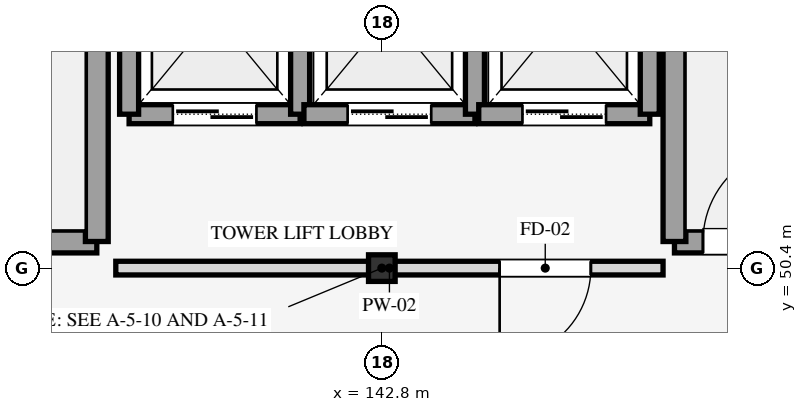
"""IFC4 building model, lengths in metres.
Left out: names, types, materials, properties, quantities, classifications, styles, units other than length and angle.
Written with IfcOpenShell. Run it as: python <this file> out.ifc"""

import sys

from ifc_helpers import new_model, si_unit, direction, frame, frame_2d, origin, origin_2d, place, context, subcontext, project, spatial, rectangle, i_section, extrude, element, fill, save


model = new_model("IFC4")
c1 = context("Model", 3, precision=1e-05, world=origin(), true_north=direction((0.0, 1.0)))
c2 = subcontext(c1, "Body", "Model", "MODEL_VIEW")
j1 = project(units=[si_unit("LENGTHUNIT", "METRE"), si_unit("PLANEANGLEUNIT", "RADIAN")], contexts=[c1])
p1 = place(None, origin())
s1 = spatial("IfcSite", under=j1, at=p1, CompositionType="ELEMENT")
p2 = place(p1, origin())
s2 = spatial("IfcBuilding", under=s1, at=p2, CompositionType="ELEMENT")
p3 = place(p2, frame((0.0, 0.0, 48.9)))
s3 = spatial("IfcBuildingStorey", under=s2, at=p3, CompositionType="ELEMENT", Elevation=48.9)
p4 = place(p3, frame((142.8, 50.4, 0.0), z_axis=(0.0, 0.0, 1.0), x_axis=(1.0, 0.0, 0.0)))
e1 = element("IfcColumn", 1, at=p4, inside=s3, PredefinedType="COLUMN", context=c2, shape_type="SweptSolid", body=[
    extrude(i_section(OverallWidth=0.35, OverallDepth=0.35, WebThickness=0.012, FlangeThickness=0.019, FilletRadius=0.02, at=origin_2d()), origin(), (0.0, 0.0, 1.0), 4.2),
])
p5 = place(p3, frame((135.05, 50.75, 0.0), z_axis=(0.0, 0.0, 1.0), x_axis=(1.0, 0.0, 0.0)))
e2 = element("IfcWall", 2, at=p5, inside=s3, PredefinedType="SHEAR", context=c2, shape_type="SweptSolid", body=[
    extrude(rectangle(XDim=4.0, YDim=0.3, at=frame_2d((2.0, 0.0))), origin(), (0.0, 0.0, 1.0), 4.2),
])
p6 = place(p5, frame((0.375, 0.0, 0.0)))
e3 = element("IfcOpeningElement", 3, at=p6, cuts=e2, PredefinedType="OPENING", context=c2, shape_type="SweptSolid", body=[
    extrude(rectangle(XDim=1.25, YDim=2.15, at=frame_2d((0.625, 1.075))), frame((0.0, 0.16, 0.0), z_axis=(0.0, -1.0, 0.0), x_axis=(1.0, 0.0, 0.0)), (0.0, 0.0, 1.0), 0.32),
])
p7 = place(p3, frame((139.05, 50.75, 0.0), z_axis=(0.0, 0.0, 1.0), x_axis=(0.0, 1.0, 0.0)))
e4 = element("IfcWall", 4, at=p7, inside=s3, PredefinedType="SHEAR", context=c2, shape_type="SweptSolid", body=[
    extrude(rectangle(XDim=14.3, YDim=0.3, at=frame_2d((7.15, 0.0))), origin(), (0.0, 0.0, 1.0), 4.2),
])
p8 = place(p3, frame((146.65, 50.75, 0.0), z_axis=(0.0, 0.0, 1.0), x_axis=(1.0, 0.0, 0.0)))
e5 = element("IfcWall", 5, at=p8, inside=s3, PredefinedType="SHEAR", context=c2, shape_type="SweptSolid", body=[
    extrude(rectangle(XDim=4.0, YDim=0.3, at=frame_2d((2.0, 0.0))), origin(), (0.0, 0.0, 1.0), 4.2),
])
p9 = place(p8, frame((0.375, 0.0, 0.0)))
e6 = element("IfcOpeningElement", 6, at=p9, cuts=e5, PredefinedType="OPENING", context=c2, shape_type="SweptSolid", body=[
    extrude(rectangle(XDim=1.25, YDim=2.15, at=frame_2d((0.625, 1.075))), frame((0.0, 0.16, 0.0), z_axis=(0.0, -1.0, 0.0), x_axis=(1.0, 0.0, 0.0)), (0.0, 0.0, 1.0), 0.32),
])
p10 = place(p3, frame((146.65, 50.75, 0.0), z_axis=(0.0, 0.0, 1.0), x_axis=(0.0, 1.0, 0.0)))
e7 = element("IfcWall", 7, at=p10, inside=s3, PredefinedType="SHEAR", context=c2, shape_type="SweptSolid", body=[
    extrude(rectangle(XDim=14.3, YDim=0.3, at=frame_2d((7.15, 0.0))), origin(), (0.0, 0.0, 1.0), 4.2),
])
p11 = place(p3, frame((139.475, 52.425, 0.0), z_axis=(0.0, 0.0, 1.0), x_axis=(1.0, 0.0, 0.0)))
e8 = element("IfcWall", 8, at=p11, inside=s3, PredefinedType="SHEAR", context=c2, shape_type="SweptSolid", body=[
    extrude(rectangle(XDim=2.25, YDim=0.25, at=frame_2d((1.125, 0.0))), origin(), (0.0, 0.0, 1.0), 3.96),
])
p12 = place(p11, frame((0.575, 0.0, 0.0)))
e9 = element("IfcOpeningElement", 9, at=p12, cuts=e8, PredefinedType="OPENING", context=c2, shape_type="SweptSolid", body=[
    extrude(rectangle(XDim=1.1, YDim=2.15, at=frame_2d((0.55, 1.075))), frame((0.0, 0.135, 0.0), z_axis=(0.0, -1.0, 0.0), x_axis=(1.0, 0.0, 0.0)), (0.0, 0.0, 1.0), 0.27),
])
for number, where, z_axis, x_axis in (
    (10, (139.475, 52.425, 0.0), (0.0, 0.0, 1.0), (0.0, 1.0, 0.0)),
    (11, (141.725, 52.425, 0.0), (0.0, 0.0, 1.0), (0.0, 1.0, 0.0)),
):
    element("IfcWall", number, at=place(p3, frame(where, z_axis=z_axis, x_axis=x_axis)), inside=s3, PredefinedType="SHEAR", context=c2, shape_type="SweptSolid", body=[
        extrude(rectangle(XDim=2.65, YDim=0.25, at=frame_2d((1.325, 0.0))), origin(), (0.0, 0.0, 1.0), 3.96),
    ])
p13 = place(p3, frame((141.775, 52.425, 0.0), z_axis=(0.0, 0.0, 1.0), x_axis=(1.0, 0.0, 0.0)))
e12 = element("IfcWall", 12, at=p13, inside=s3, PredefinedType="SHEAR", context=c2, shape_type="SweptSolid", body=[
    extrude(rectangle(XDim=2.25, YDim=0.25, at=frame_2d((1.125, 0.0))), origin(), (0.0, 0.0, 1.0), 3.96),
])
p14 = place(p13, frame((0.575, 0.0, 0.0)))
e13 = element("IfcOpeningElement", 13, at=p14, cuts=e12, PredefinedType="OPENING", context=c2, shape_type="SweptSolid", body=[
    extrude(rectangle(XDim=1.1, YDim=2.15, at=frame_2d((0.55, 1.075))), frame((0.0, 0.135, 0.0), z_axis=(0.0, -1.0, 0.0), x_axis=(1.0, 0.0, 0.0)), (0.0, 0.0, 1.0), 0.27),
])
p15 = place(p3, frame((144.025, 52.425, 0.0), z_axis=(0.0, 0.0, 1.0), x_axis=(0.0, 1.0, 0.0)))
e14 = element("IfcWall", 14, at=p15, inside=s3, PredefinedType="SHEAR", context=c2, shape_type="SweptSolid", body=[
    extrude(rectangle(XDim=2.65, YDim=0.25, at=frame_2d((1.325, 0.0))), origin(), (0.0, 0.0, 1.0), 3.96),
])
p16 = place(p3, frame((144.075, 52.425, 0.0), z_axis=(0.0, 0.0, 1.0), x_axis=(1.0, 0.0, 0.0)))
e15 = element("IfcWall", 15, at=p16, inside=s3, PredefinedType="SHEAR", context=c2, shape_type="SweptSolid", body=[
    extrude(rectangle(XDim=2.25, YDim=0.25, at=frame_2d((1.125, 0.0))), origin(), (0.0, 0.0, 1.0), 3.96),
])
p17 = place(p16, frame((0.575, 0.0, 0.0)))
e16 = element("IfcOpeningElement", 16, at=p17, cuts=e15, PredefinedType="OPENING", context=c2, shape_type="SweptSolid", body=[
    extrude(rectangle(XDim=1.1, YDim=2.15, at=frame_2d((0.55, 1.075))), frame((0.0, 0.135, 0.0), z_axis=(0.0, -1.0, 0.0), x_axis=(1.0, 0.0, 0.0)), (0.0, 0.0, 1.0), 0.27),
])
p18 = place(p3, frame((146.325, 52.425, 0.0), z_axis=(0.0, 0.0, 1.0), x_axis=(0.0, 1.0, 0.0)))
e17 = element("IfcWall", 17, at=p18, inside=s3, PredefinedType="SHEAR", context=c2, shape_type="SweptSolid", body=[
    extrude(rectangle(XDim=2.65, YDim=0.25, at=frame_2d((1.325, 0.0))), origin(), (0.0, 0.0, 1.0), 3.96),
])
p19 = place(p3, frame((139.3, 50.4, 0.0), z_axis=(0.0, 0.0, 1.0), x_axis=(1.0, 0.0, 0.0)))
e18 = element("IfcWall", 18, at=p19, inside=s3, PredefinedType="PARTITIONING", context=c2, shape_type="SweptSolid", body=[
    extrude(rectangle(XDim=7.2, YDim=0.18, at=frame_2d((3.6, 0.0))), origin(), (0.0, 0.0, 1.0), 3.24),
])
p20 = place(p19, frame((5.05, 0.0, 0.0)))
e19 = element("IfcOpeningElement", 19, at=p20, cuts=e18, PredefinedType="OPENING", context=c2, shape_type="SweptSolid", body=[
    extrude(rectangle(XDim=1.2, YDim=2.15, at=frame_2d((0.6, 1.075))), frame((0.0, 0.1, 0.0), z_axis=(0.0, -1.0, 0.0), x_axis=(1.0, 0.0, 0.0)), (0.0, 0.0, 1.0), 0.2),
])
p21 = place(p9, origin())
e20 = element("IfcDoor", 20, at=p21, inside=s3, OperationType="SINGLE_SWING_RIGHT", PredefinedType="DOOR", context=c2, shape_type="SweptSolid", body=[
    extrude(rectangle(XDim=1.25, YDim=2.15, at=frame_2d((0.625, 1.075))), frame((0.0, 0.025, 0.0), z_axis=(0.0, -1.0, 0.0), x_axis=(1.0, 0.0, 0.0)), (0.0, 0.0, 1.0), 0.05),
])
fill(e6, e20)
p22 = place(p12, origin())
e21 = element("IfcDoor", 21, at=p22, inside=s3, OperationType="DOUBLE_DOOR_SLIDING", PredefinedType="DOOR", context=c2, shape_type="SweptSolid", body=[
    extrude(rectangle(XDim=1.1, YDim=2.15, at=frame_2d((0.55, 1.075))), frame((0.0, 0.025, 0.0), z_axis=(0.0, -1.0, 0.0), x_axis=(1.0, 0.0, 0.0)), (0.0, 0.0, 1.0), 0.05),
])
fill(e9, e21)
p23 = place(p14, origin())
e22 = element("IfcDoor", 22, at=p23, inside=s3, OperationType="DOUBLE_DOOR_SLIDING", PredefinedType="DOOR", context=c2, shape_type="SweptSolid", body=[
    extrude(rectangle(XDim=1.1, YDim=2.15, at=frame_2d((0.55, 1.075))), frame((0.0, 0.025, 0.0), z_axis=(0.0, -1.0, 0.0), x_axis=(1.0, 0.0, 0.0)), (0.0, 0.0, 1.0), 0.05),
])
fill(e13, e22)
p24 = place(p17, origin())
e23 = element("IfcDoor", 23, at=p24, inside=s3, OperationType="DOUBLE_DOOR_SLIDING", PredefinedType="DOOR", context=c2, shape_type="SweptSolid", body=[
    extrude(rectangle(XDim=1.1, YDim=2.15, at=frame_2d((0.55, 1.075))), frame((0.0, 0.025, 0.0), z_axis=(0.0, -1.0, 0.0), x_axis=(1.0, 0.0, 0.0)), (0.0, 0.0, 1.0), 0.05),
])
fill(e16, e23)
p25 = place(p20, frame((1.2, 0.0, 0.0), z_axis=(0.0, 0.0, 1.0), x_axis=(-1.0, 0.0, 0.0)))
e24 = element("IfcDoor", 24, at=p25, inside=s3, OperationType="SINGLE_SWING_RIGHT", PredefinedType="DOOR", context=c2, shape_type="SweptSolid", body=[
    extrude(rectangle(XDim=1.2, YDim=2.15, at=frame_2d((0.6, 1.075))), frame((0.0, 0.025, 0.0), z_axis=(0.0, -1.0, 0.0), x_axis=(1.0, 0.0, 0.0)), (0.0, 0.0, 1.0), 0.05),
])
fill(e19, e24)
save(model, sys.argv[1])
